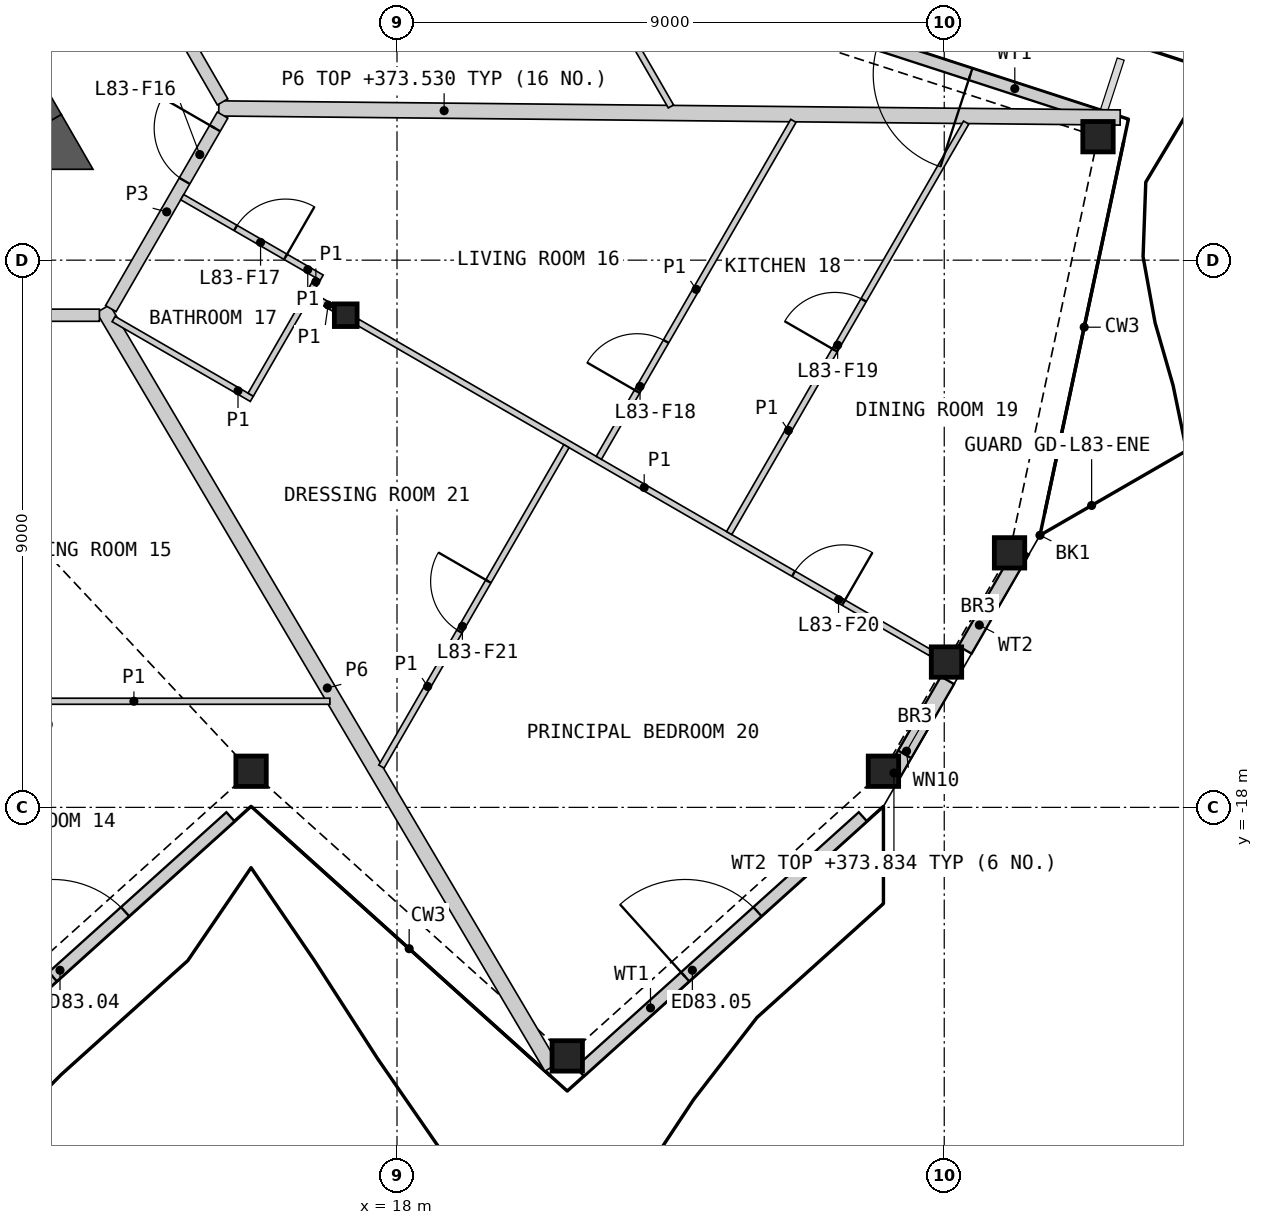
"""IFC4 building model, lengths in metres.
Left out: names, types, materials, properties, quantities, classifications, styles, units other than length and angle.
Written with IfcOpenShell. Run it as: python <this file> out.ifc"""

import sys

from ifc_helpers import new_model, si_unit, direction, frame, frame_2d, origin, origin_2d, place, context, subcontext, project, spatial, polyline, rectangle, hollow_rectangle, i_section, outline, extrude, element, fill, save


model = new_model("IFC4")
c1 = context("Model", 3, precision=1e-05, world=origin(), true_north=direction((0.0, 1.0)))
c2 = subcontext(c1, "Body", "Model", "MODEL_VIEW")
j1 = project(units=[si_unit("LENGTHUNIT", "METRE"), si_unit("PLANEANGLEUNIT", "RADIAN")], contexts=[c1])
p1 = place(None, origin())
s1 = spatial("IfcSite", under=j1, at=p1, CompositionType="ELEMENT")
p2 = place(p1, origin())
s2 = spatial("IfcBuilding", under=s1, at=p2, CompositionType="ELEMENT")
p3 = place(p2, frame((0.0, 0.0, 371.2)))
s3 = spatial("IfcBuildingStorey", under=s2, at=p3, CompositionType="ELEMENT", Elevation=371.2)
for number, where, z_axis, x_axis in (
    (1, (15.6, -17.406, 0.0), (0.0, 0.0, 1.0), (1.0, 0.0, 0.0)),
    (2, (20.8, -22.088, 0.0), (0.0, 0.0, 1.0), (1.0, 0.0, 0.0)),
    (3, (26.0, -17.406, 0.0), (0.0, 0.0, 1.0), (1.0, 0.0, 0.0)),
    (4, (27.037, -15.61, 0.0), (0.0, 0.0, 1.0), (1.0, 0.0, 0.0)),
    (5, (28.074, -13.814, 0.0), (0.0, 0.0, 1.0), (1.0, 0.0, 0.0)),
    (6, (29.529, -6.969, 0.0), (0.0, 0.0, 1.0), (1.0, 0.0, 0.0)),
):
    element("IfcColumn", number, at=place(p3, frame(where, z_axis=z_axis, x_axis=x_axis)), inside=s3, PredefinedType="COLUMN", context=c2, shape_type="SweptSolid", body=[
        extrude(hollow_rectangle(XDim=0.5, YDim=0.5, WallThickness=0.03, at=origin_2d()), origin(), (0.0, 0.0, 1.0), 3.4),
    ])
p4 = place(p3, frame((17.157, -9.906, 0.0), z_axis=(0.0, 0.0, 1.0), x_axis=(1.0, 0.0, 0.0)))
e7 = element("IfcColumn", 7, at=p4, inside=s3, PredefinedType="COLUMN", context=c2, shape_type="SweptSolid", body=[
    extrude(i_section(OverallWidth=0.374, OverallDepth=0.372, WebThickness=0.016, FlangeThickness=0.026, at=origin_2d()), origin(), (0.0, 0.0, 1.0), 3.4),
])
p5 = place(p3, frame((10.605, -22.346, 0.0), z_axis=(0.0, 0.0, 1.0), x_axis=(0.743137181878, 0.669139095339, 0.0)))
e8 = element("IfcWall", 8, at=p5, inside=s3, PredefinedType="SOLIDWALL", context=c2, shape_type="SweptSolid", body=[
    extrude(rectangle(XDim=6.265, YDim=0.2, at=frame_2d((3.133, 0.0))), origin(), (0.0, 0.0, 1.0), 2.634),
])
p6 = place(p5, frame((2.333, 0.0, 0.0)))
e9 = element("IfcOpeningElement", 9, at=p6, cuts=e8, PredefinedType="OPENING", context=c2, shape_type="SweptSolid", body=[
    extrude(rectangle(XDim=1.6, YDim=2.25, at=frame_2d((0.8, 1.125))), frame((0.0, 0.11, 0.0), z_axis=(0.0, -1.0, 0.0), x_axis=(1.0, 0.0, 0.0)), (0.0, 0.0, 1.0), 0.22),
])
p7 = place(p3, frame((21.005, -22.346, 0.0), z_axis=(0.0, 0.0, 1.0), x_axis=(0.743137181878, 0.669139095339, 0.0)))
e10 = element("IfcWall", 10, at=p7, inside=s3, PredefinedType="SOLIDWALL", context=c2, shape_type="SweptSolid", body=[
    extrude(rectangle(XDim=6.265, YDim=0.2, at=frame_2d((3.133, 0.0))), origin(), (0.0, 0.0, 1.0), 2.634),
])
p8 = place(p7, frame((2.333, 0.0, 0.0)))
e11 = element("IfcOpeningElement", 11, at=p8, cuts=e10, PredefinedType="OPENING", context=c2, shape_type="SweptSolid", body=[
    extrude(rectangle(XDim=1.6, YDim=2.25, at=frame_2d((0.8, 1.125))), frame((0.0, 0.11, 0.0), z_axis=(0.0, -1.0, 0.0), x_axis=(1.0, 0.0, 0.0)), (0.0, 0.0, 1.0), 0.22),
])
p9 = place(p3, frame((26.075, -17.604, 0.0), z_axis=(0.0, 0.0, 1.0), x_axis=(0.500017700655, 0.866015184065, 0.0)))
e12 = element("IfcWall", 12, at=p9, inside=s3, PredefinedType="SOLIDWALL", context=c2, shape_type="SweptSolid", body=[
    extrude(rectangle(XDim=1.957, YDim=0.25, at=frame_2d((0.978, 0.0))), origin(), (0.0, 0.0, 1.0), 2.634),
])
p10 = place(p9, frame((0.55, 0.0, 0.4)))
e13 = element("IfcOpeningElement", 13, at=p10, cuts=e12, PredefinedType="OPENING", context=c2, shape_type="SweptSolid", body=[
    extrude(rectangle(XDim=0.6, YDim=0.6, at=frame_2d((0.3, 0.3))), frame((0.0, 0.135, 0.0), z_axis=(0.0, -1.0, 0.0), x_axis=(1.0, 0.0, 0.0)), (0.0, 0.0, 1.0), 0.27),
])
p11 = place(p3, frame((27.342, -15.41, 0.0), z_axis=(0.0, 0.0, 1.0), x_axis=(0.500044242988, 0.865999858577, 0.0)))
e14 = element("IfcWall", 14, at=p11, inside=s3, PredefinedType="SOLIDWALL", context=c2, shape_type="SweptSolid", body=[
    extrude(rectangle(XDim=1.883, YDim=0.25, at=frame_2d((0.941, 0.0))), origin(), (0.0, 0.0, 1.0), 2.634),
])
p12 = place(p3, frame((29.65, -6.663, 0.0), z_axis=(0.0, 0.0, 1.0), x_axis=(-0.951056402988, 0.3090173431, 0.0)))
e15 = element("IfcWall", 15, at=p12, inside=s3, PredefinedType="SOLIDWALL", context=c2, shape_type="SweptSolid", body=[
    extrude(rectangle(XDim=6.265, YDim=0.2, at=frame_2d((3.133, 0.0))), origin(), (0.0, 0.0, 1.0), 2.634),
])
p13 = place(p12, frame((2.333, 0.0, 0.0)))
e16 = element("IfcOpeningElement", 16, at=p13, cuts=e15, PredefinedType="OPENING", context=c2, shape_type="SweptSolid", body=[
    extrude(rectangle(XDim=1.6, YDim=2.25, at=frame_2d((0.8, 1.125))), frame((0.0, 0.11, 0.0), z_axis=(0.0, -1.0, 0.0), x_axis=(1.0, 0.0, 0.0)), (0.0, 0.0, 1.0), 0.22),
])
p14 = place(p3, frame((12.221, -6.756, 0.0), z_axis=(0.0, 0.0, 1.0), x_axis=(-0.50000604952, 0.866021911064, 0.0)))
e17 = element("IfcWall", 17, at=p14, inside=s3, PredefinedType="SHEAR", context=c2, shape_type="SweptSolid", body=[
    extrude(rectangle(XDim=4.869, YDim=0.6, at=frame_2d((2.434, 0.0))), origin(), (0.0, 0.0, 1.0), 3.1),
])
p15 = place(p3, origin())
e18 = element("IfcWall", 18, at=p15, inside=s3, PredefinedType="SHEAR", context=c2, shape_type="SweptSolid", body=[
    extrude(outline(polyline([(11.961, -7.506), (11.961, -6.906), (12.48, -6.606), (13.0, -7.506), (11.961, -7.506)])), origin(), (0.0, 0.0, 1.0), 3.1),
])
p16 = place(p3, frame((15.069, -6.504, 0.0), z_axis=(0.0, 0.0, 1.0), x_axis=(0.999949045807, -0.01009483976, 0.0)))
e19 = element("IfcWall", 19, at=p16, inside=s3, PredefinedType="PARTITIONING", context=c2, shape_type="SweptSolid", body=[
    extrude(rectangle(XDim=14.825, YDim=0.25, at=frame_2d((7.413, 0.0))), origin(), (0.0, 0.0, 1.0), 2.33),
])
p17 = place(p3, frame((13.167, -9.798, 0.0), z_axis=(0.0, 0.0, 1.0), x_axis=(0.508707178493, -0.860939606796, 0.0)))
e20 = element("IfcWall", 20, at=p17, inside=s3, PredefinedType="PARTITIONING", context=c2, shape_type="SweptSolid", body=[
    extrude(rectangle(XDim=14.493, YDim=0.25, at=frame_2d((7.247, 0.0))), origin(), (0.0, 0.0, 1.0), 2.33),
])
p18 = place(p3, frame((8.775, -9.906, 0.0), z_axis=(0.0, 0.0, 1.0), x_axis=(1.0, 0.0, 0.0)))
e21 = element("IfcWall", 21, at=p18, inside=s3, PredefinedType="PARTITIONING", context=c2, shape_type="SweptSolid", body=[
    extrude(rectangle(XDim=4.331, YDim=0.2, at=frame_2d((2.165, 0.0))), origin(), (0.0, 0.0, 1.0), 3.1),
])
p19 = place(p3, frame((12.981, -2.673, 0.0), z_axis=(0.0, 0.0, 1.0), x_axis=(0.499986217557, -0.866033360935, 0.0)))
e22 = element("IfcWall", 22, at=p19, inside=s3, PredefinedType="PARTITIONING", context=c2, shape_type="SweptSolid", body=[
    extrude(rectangle(XDim=4.3, YDim=0.2, at=frame_2d((2.15, 0.0))), origin(), (0.0, 0.0, 1.0), 3.1),
])
p20 = place(p3, frame((13.293, -9.797, 0.0), z_axis=(0.0, 0.0, 1.0), x_axis=(0.499967746641, 0.866044024469, 0.0)))
e23 = element("IfcWall", 23, at=p20, inside=s3, PredefinedType="PARTITIONING", context=c2, shape_type="SweptSolid", body=[
    extrude(rectangle(XDim=3.676, YDim=0.2, at=frame_2d((1.838, 0.0))), origin(), (0.0, 0.0, 1.0), 3.1),
])
p21 = place(p20, frame((2.426, 0.0, 0.0)))
e24 = element("IfcOpeningElement", 24, at=p21, cuts=e23, PredefinedType="OPENING", context=c2, shape_type="SweptSolid", body=[
    extrude(rectangle(XDim=1.0, YDim=2.1, at=frame_2d((0.5, 1.05))), frame((0.0, 0.11, 0.0), z_axis=(0.0, -1.0, 0.0), x_axis=(1.0, 0.0, 0.0)), (0.0, 0.0, 1.0), 0.22),
])
p22 = place(p3, frame((17.354, -10.019, 0.0), z_axis=(0.0, 0.0, 1.0), x_axis=(0.866019680922, -0.500009912158, 0.0)))
e25 = element("IfcWall", 25, at=p22, inside=s3, PredefinedType="PARTITIONING", context=c2, shape_type="SweptSolid", body=[
    extrude(rectangle(XDim=10.881, YDim=0.1, at=frame_2d((5.44, 0.0))), origin(), (0.0, 0.0, 1.0), 2.33),
])
p23 = place(p22, frame((8.276, 0.0, 0.0)))
e26 = element("IfcOpeningElement", 26, at=p23, cuts=e25, PredefinedType="OPENING", context=c2, shape_type="SweptSolid", body=[
    extrude(rectangle(XDim=0.95, YDim=2.1, at=frame_2d((0.475, 1.05))), frame((0.0, 0.06, 0.0), z_axis=(0.0, -1.0, 0.0), x_axis=(1.0, 0.0, 0.0)), (0.0, 0.0, 1.0), 0.12),
])
p24 = place(p3, frame((23.463, -13.488, 0.0), z_axis=(0.0, 0.0, 1.0), x_axis=(0.500012519194, 0.866018175704, 0.0)))
e27 = element("IfcWall", 27, at=p24, inside=s3, PredefinedType="PARTITIONING", context=c2, shape_type="SweptSolid", body=[
    extrude(rectangle(XDim=7.796, YDim=0.1, at=frame_2d((3.898, 0.0))), origin(), (0.0, 0.0, 1.0), 2.33),
])
p25 = place(p24, frame((3.473, 0.0, 0.0)))
e28 = element("IfcOpeningElement", 28, at=p25, cuts=e27, PredefinedType="OPENING", context=c2, shape_type="SweptSolid", body=[
    extrude(rectangle(XDim=0.95, YDim=2.1, at=frame_2d((0.475, 1.05))), frame((0.0, 0.06, 0.0), z_axis=(0.0, -1.0, 0.0), x_axis=(1.0, 0.0, 0.0)), (0.0, 0.0, 1.0), 0.12),
])
p26 = place(p3, frame((19.302, -0.923, 0.0), z_axis=(0.0, 0.0, 1.0), x_axis=(0.499999516514, -0.866025682925, 0.0)))
e29 = element("IfcWall", 29, at=p26, inside=s3, PredefinedType="PARTITIONING", context=c2, shape_type="SweptSolid", body=[
    extrude(rectangle(XDim=6.407, YDim=0.1, at=frame_2d((3.204, 0.0))), origin(), (0.0, 0.0, 1.0), 2.33),
])
p27 = place(p26, frame((2.476, 0.0, 0.0)))
e30 = element("IfcOpeningElement", 30, at=p27, cuts=e29, PredefinedType="OPENING", context=c2, shape_type="SweptSolid", body=[
    extrude(rectangle(XDim=0.95, YDim=2.1, at=frame_2d((0.475, 1.05))), frame((0.0, 0.06, 0.0), z_axis=(0.0, -1.0, 0.0), x_axis=(1.0, 0.0, 0.0)), (0.0, 0.0, 1.0), 0.12),
])
p28 = place(p3, frame((21.319, -12.251, 0.0), z_axis=(0.0, 0.0, 1.0), x_axis=(0.499999833739, 0.866025499775, 0.0)))
e31 = element("IfcWall", 31, at=p28, inside=s3, PredefinedType="PARTITIONING", context=c2, shape_type="SweptSolid", body=[
    extrude(rectangle(XDim=6.4, YDim=0.1, at=frame_2d((3.2, 0.0))), origin(), (0.0, 0.0, 1.0), 2.33),
])
p29 = place(p28, frame((1.26, 0.0, 0.0)))
e32 = element("IfcOpeningElement", 32, at=p29, cuts=e31, PredefinedType="OPENING", context=c2, shape_type="SweptSolid", body=[
    extrude(rectangle(XDim=0.95, YDim=2.1, at=frame_2d((0.475, 1.05))), frame((0.0, 0.06, 0.0), z_axis=(0.0, -1.0, 0.0), x_axis=(1.0, 0.0, 0.0)), (0.0, 0.0, 1.0), 0.12),
])
p30 = place(p3, frame((10.45, -16.255, 0.0), z_axis=(0.0, 0.0, 1.0), x_axis=(1.0, 0.0, 0.0)))
e33 = element("IfcWall", 33, at=p30, inside=s3, PredefinedType="PARTITIONING", context=c2, shape_type="SweptSolid", body=[
    extrude(rectangle(XDim=6.447, YDim=0.1, at=frame_2d((3.223, 0.0))), origin(), (0.0, 0.0, 1.0), 2.33),
])
p31 = place(p30, frame((0.76, 0.0, 0.0)))
e34 = element("IfcOpeningElement", 34, at=p31, cuts=e33, PredefinedType="OPENING", context=c2, shape_type="SweptSolid", body=[
    extrude(rectangle(XDim=0.95, YDim=2.1, at=frame_2d((0.475, 1.05))), frame((0.0, 0.06, 0.0), z_axis=(0.0, -1.0, 0.0), x_axis=(1.0, 0.0, 0.0)), (0.0, 0.0, 1.0), 0.12),
])
p32 = place(p3, frame((17.744, -17.329, 0.0), z_axis=(0.0, 0.0, 1.0), x_axis=(0.49997479812, 0.866039953608, 0.0)))
e35 = element("IfcWall", 35, at=p32, inside=s3, PredefinedType="PARTITIONING", context=c2, shape_type="SweptSolid", body=[
    extrude(rectangle(XDim=6.086, YDim=0.1, at=frame_2d((3.043, 0.0))), origin(), (0.0, 0.0, 1.0), 2.33),
])
p33 = place(p32, frame((2.568, 0.0, 0.0)))
e36 = element("IfcOpeningElement", 36, at=p33, cuts=e35, PredefinedType="OPENING", context=c2, shape_type="SweptSolid", body=[
    extrude(rectangle(XDim=0.95, YDim=2.1, at=frame_2d((0.475, 1.05))), frame((0.0, 0.06, 0.0), z_axis=(0.0, -1.0, 0.0), x_axis=(1.0, 0.0, 0.0)), (0.0, 0.0, 1.0), 0.12),
])
p34 = place(p3, frame((13.339, -9.968, 0.0), z_axis=(0.0, 0.0, 1.0), x_axis=(0.866013657776, -0.500020344131, 0.0)))
e37 = element("IfcWall", 37, at=p34, inside=s3, PredefinedType="PARTITIONING", context=c2, shape_type="SweptSolid", body=[
    extrude(rectangle(XDim=2.625, YDim=0.1, at=frame_2d((1.312, 0.0))), origin(), (0.0, 0.0, 1.0), 2.33),
])
p35 = place(p3, frame((14.467, -7.964, 0.0), z_axis=(0.0, 0.0, 1.0), x_axis=(0.866062824362, -0.499935180056, 0.0)))
e38 = element("IfcWall", 38, at=p35, inside=s3, PredefinedType="PARTITIONING", context=c2, shape_type="SweptSolid", body=[
    extrude(rectangle(XDim=2.649, YDim=0.1, at=frame_2d((1.325, 0.0))), origin(), (0.0, 0.0, 1.0), 2.33),
])
p36 = place(p35, frame((1.013, 0.0, 0.0)))
e39 = element("IfcOpeningElement", 39, at=p36, cuts=e38, PredefinedType="OPENING", context=c2, shape_type="SweptSolid", body=[
    extrude(rectangle(XDim=0.95, YDim=2.1, at=frame_2d((0.475, 1.05))), frame((0.0, 0.06, 0.0), z_axis=(0.0, -1.0, 0.0), x_axis=(1.0, 0.0, 0.0)), (0.0, 0.0, 1.0), 0.12),
])
p37 = place(p3, frame((15.594, -11.212, 0.0), z_axis=(0.0, 0.0, 1.0), x_axis=(0.499958068602, 0.866049611535, 0.0)))
e40 = element("IfcWall", 40, at=p37, inside=s3, PredefinedType="PARTITIONING", context=c2, shape_type="SweptSolid", body=[
    extrude(rectangle(XDim=1.973, YDim=0.1, at=frame_2d((0.987, 0.0))), origin(), (0.0, 0.0, 1.0), 2.33),
])
p38 = place(p3, frame((16.594, -9.581, 0.0), z_axis=(0.0, 0.0, 1.0), x_axis=(0.866137484628, -0.499805820016, 0.0)))
e41 = element("IfcWall", 41, at=p38, inside=s3, PredefinedType="PARTITIONING", context=c2, shape_type="SweptSolid", body=[
    extrude(rectangle(XDim=0.423, YDim=0.1, at=frame_2d((0.211, 0.0))), origin(), (0.0, 0.0, 1.0), 2.33),
])
p39 = place(p3, frame((16.582, -9.501, 0.0), z_axis=(0.0, 0.0, 1.0), x_axis=(0.49742780181, 0.86750537865, 0.0)))
e42 = element("IfcWall", 42, at=p39, inside=s3, PredefinedType="PARTITIONING", context=c2, shape_type="SweptSolid", body=[
    extrude(rectangle(XDim=0.224, YDim=0.1, at=frame_2d((0.112, 0.0))), origin(), (0.0, 0.0, 1.0), 2.33),
])
p40 = place(p6, origin())
e43 = element("IfcDoor", 43, at=p40, inside=s3, OperationType="DOUBLE_DOOR_SINGLE_SWING", PredefinedType="DOOR", context=c2, shape_type="SweptSolid", body=[
    extrude(rectangle(XDim=1.6, YDim=2.25, at=frame_2d((0.8, 1.125))), frame((0.0, 0.025, 0.0), z_axis=(0.0, -1.0, 0.0), x_axis=(1.0, 0.0, 0.0)), (0.0, 0.0, 1.0), 0.05),
])
fill(e9, e43)
p41 = place(p8, origin())
e44 = element("IfcDoor", 44, at=p41, inside=s3, OperationType="DOUBLE_DOOR_SINGLE_SWING", PredefinedType="DOOR", context=c2, shape_type="SweptSolid", body=[
    extrude(rectangle(XDim=1.6, YDim=2.25, at=frame_2d((0.8, 1.125))), frame((0.0, 0.025, 0.0), z_axis=(0.0, -1.0, 0.0), x_axis=(1.0, 0.0, 0.0)), (0.0, 0.0, 1.0), 0.05),
])
fill(e11, e44)
p42 = place(p10, origin())
e45 = element("IfcWindow", 45, at=p42, inside=s3, PartitioningType="SINGLE_PANEL", PredefinedType="WINDOW", context=c2, shape_type="SweptSolid", body=[
    extrude(rectangle(XDim=0.6, YDim=0.6, at=frame_2d((0.3, 0.3))), frame((0.0, 0.03, 0.0), z_axis=(0.0, -1.0, 0.0), x_axis=(1.0, 0.0, 0.0)), (0.0, 0.0, 1.0), 0.06),
])
fill(e13, e45)
p43 = place(p13, origin())
e46 = element("IfcDoor", 46, at=p43, inside=s3, OperationType="DOUBLE_DOOR_SINGLE_SWING", PredefinedType="DOOR", context=c2, shape_type="SweptSolid", body=[
    extrude(rectangle(XDim=1.6, YDim=2.25, at=frame_2d((0.8, 1.125))), frame((0.0, 0.025, 0.0), z_axis=(0.0, -1.0, 0.0), x_axis=(1.0, 0.0, 0.0)), (0.0, 0.0, 1.0), 0.05),
])
fill(e16, e46)
p44 = place(p21, origin())
e47 = element("IfcDoor", 47, at=p44, inside=s3, OperationType="SINGLE_SWING_RIGHT", PredefinedType="DOOR", context=c2, shape_type="SweptSolid", body=[
    extrude(rectangle(XDim=1.0, YDim=2.1, at=frame_2d((0.5, 1.05))), frame((0.0, 0.025, 0.0), z_axis=(0.0, -1.0, 0.0), x_axis=(1.0, 0.0, 0.0)), (0.0, 0.0, 1.0), 0.05),
])
fill(e24, e47)
p45 = place(p36, origin())
e48 = element("IfcDoor", 48, at=p45, inside=s3, OperationType="SINGLE_SWING_RIGHT", PredefinedType="DOOR", context=c2, shape_type="SweptSolid", body=[
    extrude(rectangle(XDim=0.95, YDim=2.1, at=frame_2d((0.475, 1.05))), frame((0.0, 0.025, 0.0), z_axis=(0.0, -1.0, 0.0), x_axis=(1.0, 0.0, 0.0)), (0.0, 0.0, 1.0), 0.05),
])
fill(e39, e48)
p46 = place(p29, origin())
e49 = element("IfcDoor", 49, at=p46, inside=s3, OperationType="SINGLE_SWING_LEFT", PredefinedType="DOOR", context=c2, shape_type="SweptSolid", body=[
    extrude(rectangle(XDim=0.95, YDim=2.1, at=frame_2d((0.475, 1.05))), frame((0.0, 0.025, 0.0), z_axis=(0.0, -1.0, 0.0), x_axis=(1.0, 0.0, 0.0)), (0.0, 0.0, 1.0), 0.05),
])
fill(e32, e49)
p47 = place(p25, origin())
e50 = element("IfcDoor", 50, at=p47, inside=s3, OperationType="SINGLE_SWING_LEFT", PredefinedType="DOOR", context=c2, shape_type="SweptSolid", body=[
    extrude(rectangle(XDim=0.95, YDim=2.1, at=frame_2d((0.475, 1.05))), frame((0.0, 0.025, 0.0), z_axis=(0.0, -1.0, 0.0), x_axis=(1.0, 0.0, 0.0)), (0.0, 0.0, 1.0), 0.05),
])
fill(e28, e50)
p48 = place(p23, origin())
e51 = element("IfcDoor", 51, at=p48, inside=s3, OperationType="SINGLE_SWING_RIGHT", PredefinedType="DOOR", context=c2, shape_type="SweptSolid", body=[
    extrude(rectangle(XDim=0.95, YDim=2.1, at=frame_2d((0.475, 1.05))), frame((0.0, 0.025, 0.0), z_axis=(0.0, -1.0, 0.0), x_axis=(1.0, 0.0, 0.0)), (0.0, 0.0, 1.0), 0.05),
])
fill(e26, e51)
p49 = place(p33, origin())
e52 = element("IfcDoor", 52, at=p49, inside=s3, OperationType="SINGLE_SWING_RIGHT", PredefinedType="DOOR", context=c2, shape_type="SweptSolid", body=[
    extrude(rectangle(XDim=0.95, YDim=2.1, at=frame_2d((0.475, 1.05))), frame((0.0, 0.025, 0.0), z_axis=(0.0, -1.0, 0.0), x_axis=(1.0, 0.0, 0.0)), (0.0, 0.0, 1.0), 0.05),
])
fill(e36, e52)
save(model, sys.argv[1])
